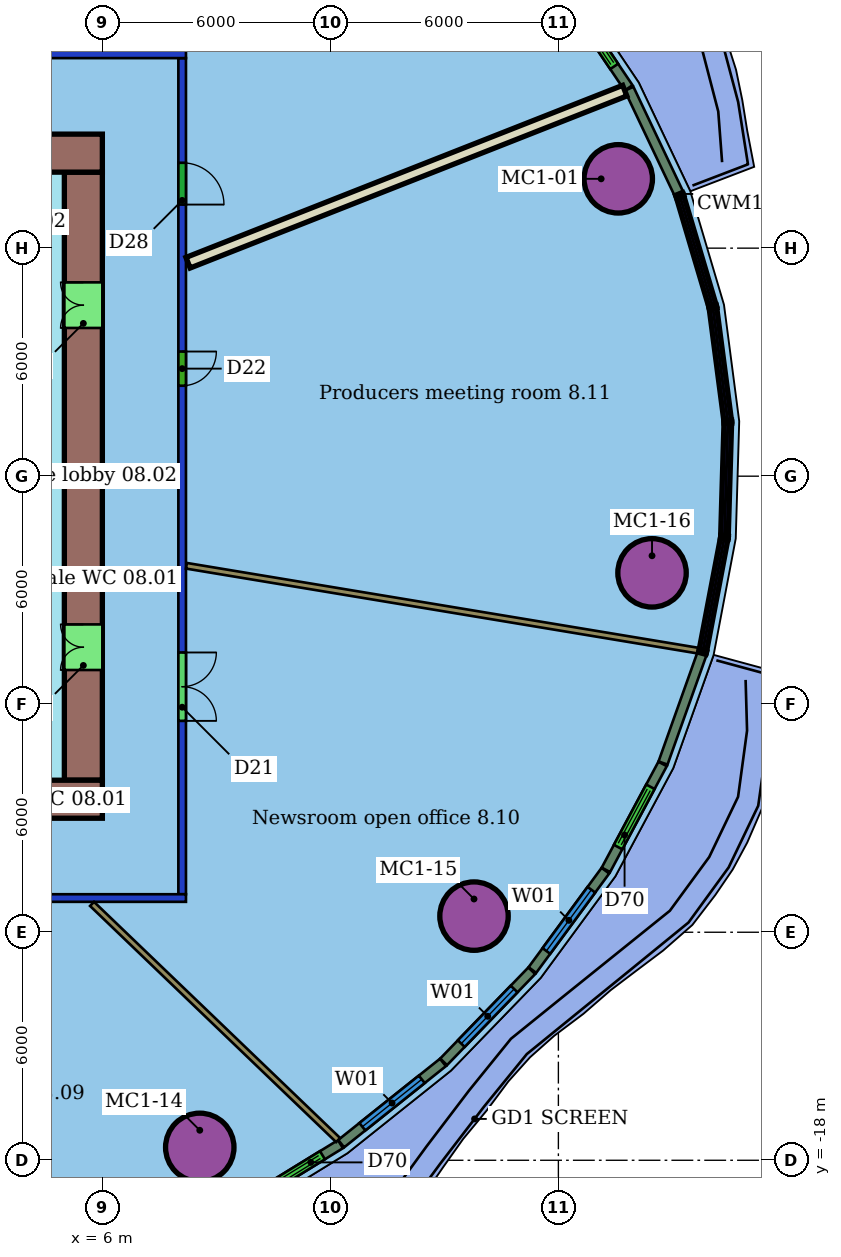
"""IFC4 building model, lengths in metres.
Left out: names, types, materials, properties, quantities, classifications, styles, units other than length and angle.
Written with IfcOpenShell. Run it as: python <this file> out.ifc"""

import sys

from ifc_helpers import new_model, si_unit, direction, frame, frame_2d, origin, origin_2d, place, context, subcontext, project, spatial, rectangle, hollow_circle, extrude, element, fill, save


model = new_model("IFC4")
c1 = context("Model", 3, precision=1e-05, world=origin(), true_north=direction((0.0, 1.0)))
c2 = subcontext(c1, "Body", "Model", "MODEL_VIEW")
j1 = project(units=[si_unit("LENGTHUNIT", "METRE"), si_unit("PLANEANGLEUNIT", "RADIAN")], contexts=[c1])
p1 = place(None, origin())
s1 = spatial("IfcSite", under=j1, at=p1, CompositionType="ELEMENT")
p2 = place(p1, origin())
s2 = spatial("IfcBuilding", under=s1, at=p2, CompositionType="ELEMENT")
p3 = place(p2, frame((0.0, 0.0, 47.1)))
s3 = spatial("IfcBuildingStorey", under=s2, at=p3, CompositionType="ELEMENT", Elevation=47.1)
for number, where, z_axis, x_axis in (
    (1, (19.575, 7.824, 0.0), (0.0, 0.0, 1.0), (1.0, 0.0, 0.0)),
    (2, (8.563, -17.66, 0.0), (0.0, 0.0, 1.0), (1.0, 0.0, 0.0)),
    (3, (15.78, -11.576, 0.0), (0.0, 0.0, 1.0), (1.0, 0.0, 0.0)),
    (4, (20.464, -2.543, 0.0), (0.0, 0.0, 1.0), (1.0, 0.0, 0.0)),
):
    element("IfcColumn", number, at=place(p3, frame(where, z_axis=z_axis, x_axis=x_axis)), inside=s3, PredefinedType="COLUMN", context=c2, shape_type="SweptSolid", body=[
        extrude(hollow_circle(Radius=0.9, WallThickness=0.06, at=origin_2d()), origin(), (0.0, 0.0, 1.0), 3.55),
    ])
p4 = place(p3, frame((8.2, -11.1, 0.0), z_axis=(0.0, 0.0, 1.0), x_axis=(-1.0, 0.0, 0.0)))
e5 = element("IfcWall", 5, at=p4, inside=s3, PredefinedType="PARTITIONING", context=c2, shape_type="SweptSolid", body=[
    extrude(rectangle(XDim=28.4, YDim=0.2, at=frame_2d((14.2, 0.0))), origin(), (0.0, 0.0, 1.0), 2.85),
])
p5 = place(p4, frame((25.038, 0.0, 0.0)))
e6 = element("IfcOpeningElement", 6, at=p5, cuts=e5, PredefinedType="OPENING", context=c2, shape_type="SweptSolid", body=[
    extrude(rectangle(XDim=1.0, YDim=2.1, at=frame_2d((0.5, 1.05))), frame((0.0, 0.11, 0.0), z_axis=(0.0, -1.0, 0.0), x_axis=(1.0, 0.0, 0.0)), (0.0, 0.0, 1.0), 0.22),
])
p6 = place(p4, frame((18.73, 0.0, 0.0)))
e7 = element("IfcOpeningElement", 7, at=p6, cuts=e5, PredefinedType="OPENING", context=c2, shape_type="SweptSolid", body=[
    extrude(rectangle(XDim=1.8, YDim=2.1, at=frame_2d((0.9, 1.05))), frame((0.0, 0.11, 0.0), z_axis=(0.0, -1.0, 0.0), x_axis=(1.0, 0.0, 0.0)), (0.0, 0.0, 1.0), 0.22),
])
p7 = place(p4, frame((8.223, 0.0, 0.0)))
e8 = element("IfcOpeningElement", 8, at=p7, cuts=e5, PredefinedType="OPENING", context=c2, shape_type="SweptSolid", body=[
    extrude(rectangle(XDim=0.9, YDim=2.1, at=frame_2d((0.45, 1.05))), frame((0.0, 0.11, 0.0), z_axis=(0.0, -1.0, 0.0), x_axis=(1.0, 0.0, 0.0)), (0.0, 0.0, 1.0), 0.22),
])
p8 = place(p3, frame((-20.2, 11.1, 0.0), z_axis=(0.0, 0.0, 1.0), x_axis=(1.0, 0.0, 0.0)))
e9 = element("IfcWall", 9, at=p8, inside=s3, PredefinedType="PARTITIONING", context=c2, shape_type="SweptSolid", body=[
    extrude(rectangle(XDim=28.4, YDim=0.2, at=frame_2d((14.2, 0.0))), origin(), (0.0, 0.0, 1.0), 2.85),
])
p9 = place(p8, frame((19.669, 0.0, 0.0)))
e10 = element("IfcOpeningElement", 10, at=p9, cuts=e9, PredefinedType="OPENING", context=c2, shape_type="SweptSolid", body=[
    extrude(rectangle(XDim=1.2, YDim=2.1, at=frame_2d((0.6, 1.05))), frame((0.0, 0.11, 0.0), z_axis=(0.0, -1.0, 0.0), x_axis=(1.0, 0.0, 0.0)), (0.0, 0.0, 1.0), 0.22),
])
p10 = place(p8, frame((10.757, 0.0, 0.0)))
e11 = element("IfcOpeningElement", 11, at=p10, cuts=e9, PredefinedType="OPENING", context=c2, shape_type="SweptSolid", body=[
    extrude(rectangle(XDim=1.5, YDim=2.1, at=frame_2d((0.75, 1.05))), frame((0.0, 0.11, 0.0), z_axis=(0.0, -1.0, 0.0), x_axis=(1.0, 0.0, 0.0)), (0.0, 0.0, 1.0), 0.22),
])
p11 = place(p8, frame((5.946, 0.0, 0.0)))
e12 = element("IfcOpeningElement", 12, at=p11, cuts=e9, PredefinedType="OPENING", context=c2, shape_type="SweptSolid", body=[
    extrude(rectangle(XDim=1.1, YDim=2.1, at=frame_2d((0.55, 1.05))), frame((0.0, 0.11, 0.0), z_axis=(0.0, -1.0, 0.0), x_axis=(1.0, 0.0, 0.0)), (0.0, 0.0, 1.0), 0.22),
])
p12 = place(p3, frame((8.1, 11.0, 0.0), z_axis=(0.0, 0.0, 1.0), x_axis=(0.0, -1.0, 0.0)))
e13 = element("IfcWall", 13, at=p12, inside=s3, PredefinedType="PARTITIONING", context=c2, shape_type="SweptSolid", body=[
    extrude(rectangle(XDim=22.0, YDim=0.2, at=frame_2d((11.0, 0.0))), origin(), (0.0, 0.0, 1.0), 2.85),
])
p13 = place(p12, frame((2.753, 0.0, 0.0)))
e14 = element("IfcOpeningElement", 14, at=p13, cuts=e13, PredefinedType="OPENING", context=c2, shape_type="SweptSolid", body=[
    extrude(rectangle(XDim=1.1, YDim=2.1, at=frame_2d((0.55, 1.05))), frame((0.0, 0.11, 0.0), z_axis=(0.0, -1.0, 0.0), x_axis=(1.0, 0.0, 0.0)), (0.0, 0.0, 1.0), 0.22),
])
p14 = place(p12, frame((15.639, 0.0, 0.0)))
e15 = element("IfcOpeningElement", 15, at=p14, cuts=e13, PredefinedType="OPENING", context=c2, shape_type="SweptSolid", body=[
    extrude(rectangle(XDim=1.8, YDim=2.1, at=frame_2d((0.9, 1.05))), frame((0.0, 0.11, 0.0), z_axis=(0.0, -1.0, 0.0), x_axis=(1.0, 0.0, 0.0)), (0.0, 0.0, 1.0), 0.22),
])
p15 = place(p12, frame((7.72, 0.0, 0.0)))
e16 = element("IfcOpeningElement", 16, at=p15, cuts=e13, PredefinedType="OPENING", context=c2, shape_type="SweptSolid", body=[
    extrude(rectangle(XDim=0.9, YDim=2.1, at=frame_2d((0.45, 1.05))), frame((0.0, 0.11, 0.0), z_axis=(0.0, -1.0, 0.0), x_axis=(1.0, 0.0, 0.0)), (0.0, 0.0, 1.0), 0.22),
])
p16 = place(p3, frame((19.747, 10.144, 0.0), z_axis=(0.0, 0.0, 1.0), x_axis=(-0.930393072446, -0.366563406172, 0.0)))
e17 = element("IfcWall", 17, at=p16, inside=s3, PredefinedType="PARTITIONING", context=c2, shape_type="SweptSolid", body=[
    extrude(rectangle(XDim=12.352, YDim=0.3, at=frame_2d((6.176, 0.0))), origin(), (0.0, 0.0, 1.0), 3.55),
])
p17 = place(p3, frame((12.204, -17.468, 0.0), z_axis=(0.0, 0.0, 1.0), x_axis=(-0.721538439263, 0.692374378978, 0.0)))
e18 = element("IfcWall", 18, at=p17, inside=s3, PredefinedType="PARTITIONING", context=c2, shape_type="SweptSolid", body=[
    extrude(rectangle(XDim=8.974, YDim=0.15, at=frame_2d((4.487, 0.0))), origin(), (0.0, 0.0, 1.0), 3.55),
])
p18 = place(p3, frame((21.675, -4.59, 0.0), z_axis=(0.0, 0.0, 1.0), x_axis=(-0.986520789814, 0.163635971791, 0.0)))
e19 = element("IfcWall", 19, at=p18, inside=s3, PredefinedType="PARTITIONING", context=c2, shape_type="SweptSolid", body=[
    extrude(rectangle(XDim=13.647, YDim=0.15, at=frame_2d((6.823, 0.0))), origin(), (0.0, 0.0, 1.0), 3.55),
])
p19 = place(p3, frame((21.168, 7.439, 0.0), z_axis=(0.0, 0.0, 1.0), x_axis=(-0.428609341076, 0.903489918451, 0.0)))
e20 = element("IfcWall", 20, at=p19, inside=s3, PredefinedType="SOLIDWALL", context=c2, shape_type="SweptSolid", body=[
    extrude(rectangle(XDim=3.05, YDim=0.25, at=frame_2d((1.525, 0.0))), origin(), (0.0, 0.0, 1.0), 3.15),
])
p20 = place(p3, frame((19.848, 10.217, 0.0), z_axis=(0.0, 0.0, 1.0), x_axis=(-0.558028768247, 0.829821603605, 0.0)))
e21 = element("IfcWall", 21, at=p20, inside=s3, PredefinedType="SOLIDWALL", context=c2, shape_type="SweptSolid", body=[
    extrude(rectangle(XDim=3.161, YDim=0.25, at=frame_2d((1.581, 0.0))), origin(), (0.0, 0.0, 1.0), 3.15),
])
p21 = place(p20, frame((0.68, 0.0, 0.0)))
e22 = element("IfcOpeningElement", 22, at=p21, cuts=e21, PredefinedType="OPENING", context=c2, shape_type="SweptSolid", body=[
    extrude(rectangle(XDim=1.8, YDim=2.4, at=frame_2d((0.9, 1.2))), frame((0.0, 0.135, 0.0), z_axis=(0.0, -1.0, 0.0), x_axis=(1.0, 0.0, 0.0)), (0.0, 0.0, 1.0), 0.27),
])
p22 = place(p3, frame((9.274, -19.415, 0.0), z_axis=(0.0, 0.0, 1.0), x_axis=(0.851885012521, 0.523728866344, 0.0)))
e23 = element("IfcWall", 23, at=p22, inside=s3, PredefinedType="SOLIDWALL", context=c2, shape_type="SweptSolid", body=[
    extrude(rectangle(XDim=3.511, YDim=0.25, at=frame_2d((1.756, 0.0))), origin(), (0.0, 0.0, 1.0), 3.15),
])
p23 = place(p22, frame((1.156, 0.0, 0.0)))
e24 = element("IfcOpeningElement", 24, at=p23, cuts=e23, PredefinedType="OPENING", context=c2, shape_type="SweptSolid", body=[
    extrude(rectangle(XDim=1.8, YDim=2.4, at=frame_2d((0.9, 1.2))), frame((0.0, 0.135, 0.0), z_axis=(0.0, -1.0, 0.0), x_axis=(1.0, 0.0, 0.0)), (0.0, 0.0, 1.0), 0.27),
])
p24 = place(p3, frame((12.284, -17.562, 0.0), z_axis=(0.0, 0.0, 1.0), x_axis=(0.78173709479, 0.623608141888, 0.0)))
e25 = element("IfcWall", 25, at=p24, inside=s3, PredefinedType="SOLIDWALL", context=c2, shape_type="SweptSolid", body=[
    extrude(rectangle(XDim=3.426, YDim=0.25, at=frame_2d((1.713, 0.0))), origin(), (0.0, 0.0, 1.0), 3.15),
])
p25 = place(p24, frame((0.713, 0.0, 0.8)))
e26 = element("IfcOpeningElement", 26, at=p25, cuts=e25, PredefinedType="OPENING", context=c2, shape_type="SweptSolid", body=[
    extrude(rectangle(XDim=2.0, YDim=2.2, at=frame_2d((1.0, 1.1))), frame((0.0, 0.135, 0.0), z_axis=(0.0, -1.0, 0.0), x_axis=(1.0, 0.0, 0.0)), (0.0, 0.0, 1.0), 0.27),
])
p26 = place(p3, frame((14.98, -15.41, 0.0), z_axis=(0.0, 0.0, 1.0), x_axis=(0.695444598624, 0.718579717391, 0.0)))
e27 = element("IfcWall", 27, at=p26, inside=s3, PredefinedType="SOLIDWALL", context=c2, shape_type="SweptSolid", body=[
    extrude(rectangle(XDim=3.335, YDim=0.25, at=frame_2d((1.667, 0.0))), origin(), (0.0, 0.0, 1.0), 3.15),
])
p27 = place(p26, frame((0.667, 0.0, 0.8)))
e28 = element("IfcOpeningElement", 28, at=p27, cuts=e27, PredefinedType="OPENING", context=c2, shape_type="SweptSolid", body=[
    extrude(rectangle(XDim=2.0, YDim=2.2, at=frame_2d((1.0, 1.1))), frame((0.0, 0.135, 0.0), z_axis=(0.0, -1.0, 0.0), x_axis=(1.0, 0.0, 0.0)), (0.0, 0.0, 1.0), 0.27),
])
p28 = place(p3, frame((17.316, -12.994, 0.0), z_axis=(0.0, 0.0, 1.0), x_axis=(0.592218050456, 0.805777748957, 0.0)))
e29 = element("IfcWall", 29, at=p28, inside=s3, PredefinedType="SOLIDWALL", context=c2, shape_type="SweptSolid", body=[
    extrude(rectangle(XDim=3.244, YDim=0.25, at=frame_2d((1.622, 0.0))), origin(), (0.0, 0.0, 1.0), 3.15),
])
p29 = place(p28, frame((0.622, 0.0, 0.8)))
e30 = element("IfcOpeningElement", 30, at=p29, cuts=e29, PredefinedType="OPENING", context=c2, shape_type="SweptSolid", body=[
    extrude(rectangle(XDim=2.0, YDim=2.2, at=frame_2d((1.0, 1.1))), frame((0.0, 0.135, 0.0), z_axis=(0.0, -1.0, 0.0), x_axis=(1.0, 0.0, 0.0)), (0.0, 0.0, 1.0), 0.27),
])
p30 = place(p3, frame((19.251, -10.358, 0.0), z_axis=(0.0, 0.0, 1.0), x_axis=(0.47194273939, 0.88162920252, 0.0)))
e31 = element("IfcWall", 31, at=p30, inside=s3, PredefinedType="SOLIDWALL", context=c2, shape_type="SweptSolid", body=[
    extrude(rectangle(XDim=3.161, YDim=0.25, at=frame_2d((1.58, 0.0))), origin(), (0.0, 0.0, 1.0), 3.15),
])
p31 = place(p30, frame((0.68, 0.0, 0.0)))
e32 = element("IfcOpeningElement", 32, at=p31, cuts=e31, PredefinedType="OPENING", context=c2, shape_type="SweptSolid", body=[
    extrude(rectangle(XDim=1.8, YDim=2.4, at=frame_2d((0.9, 1.2))), frame((0.0, 0.135, 0.0), z_axis=(0.0, -1.0, 0.0), x_axis=(1.0, 0.0, 0.0)), (0.0, 0.0, 1.0), 0.27),
])
p32 = place(p3, frame((20.753, -7.547, 0.0), z_axis=(0.0, 0.0, 1.0), x_axis=(0.335758185924, 0.941948215448, 0.0)))
e33 = element("IfcWall", 33, at=p32, inside=s3, PredefinedType="SOLIDWALL", context=c2, shape_type="SweptSolid", body=[
    extrude(rectangle(XDim=3.05, YDim=0.25, at=frame_2d((1.525, 0.0))), origin(), (0.0, 0.0, 1.0), 3.15),
])
p33 = place(p3, frame((6.0, 8.5, 0.0), z_axis=(0.0, 0.0, 1.0), x_axis=(-1.0, 0.0, 0.0)))
e34 = element("IfcWall", 34, at=p33, inside=s3, PredefinedType="SHEAR", context=c2, shape_type="SweptSolid", body=[
    extrude(rectangle(XDim=12.0, YDim=1.0, at=frame_2d((6.0, 0.0))), origin(), (0.0, 0.0, 1.0), 3.4),
])
p34 = place(p33, frame((5.6, 0.0, 0.0)))
e35 = element("IfcOpeningElement", 35, at=p34, cuts=e34, PredefinedType="OPENING", context=c2, shape_type="SweptSolid", body=[
    extrude(rectangle(XDim=1.2, YDim=2.1, at=frame_2d((0.6, 1.05))), frame((0.0, 0.51, 0.0), z_axis=(0.0, -1.0, 0.0), x_axis=(1.0, 0.0, 0.0)), (0.0, 0.0, 1.0), 1.02),
])
p35 = place(p3, frame((-18.0, -8.5, 0.0), z_axis=(0.0, 0.0, 1.0), x_axis=(1.0, 0.0, 0.0)))
e36 = element("IfcWall", 36, at=p35, inside=s3, PredefinedType="SHEAR", context=c2, shape_type="SweptSolid", body=[
    extrude(rectangle(XDim=24.0, YDim=1.0, at=frame_2d((12.0, 0.0))), origin(), (0.0, 0.0, 1.0), 3.4),
])
p36 = place(p35, frame((6.0, 0.0, 0.0)))
e37 = element("IfcOpeningElement", 37, at=p36, cuts=e36, PredefinedType="OPENING", context=c2, shape_type="SweptSolid", body=[
    extrude(rectangle(XDim=1.2, YDim=2.1, at=frame_2d((0.6, 1.05))), frame((0.0, 0.51, 0.0), z_axis=(0.0, -1.0, 0.0), x_axis=(1.0, 0.0, 0.0)), (0.0, 0.0, 1.0), 1.02),
])
p37 = place(p3, frame((5.5, -8.0, 0.0), z_axis=(0.0, 0.0, 1.0), x_axis=(0.0, 1.0, 0.0)))
e38 = element("IfcWall", 38, at=p37, inside=s3, PredefinedType="SHEAR", context=c2, shape_type="SweptSolid", body=[
    extrude(rectangle(XDim=16.0, YDim=1.0, at=frame_2d((8.0, 0.0))), origin(), (0.0, 0.0, 1.0), 3.4),
])
p38 = place(p37, frame((2.9, 0.0, 0.0)))
e39 = element("IfcOpeningElement", 39, at=p38, cuts=e38, PredefinedType="OPENING", context=c2, shape_type="SweptSolid", body=[
    extrude(rectangle(XDim=1.2, YDim=2.1, at=frame_2d((0.6, 1.05))), frame((0.0, 0.51, 0.0), z_axis=(0.0, -1.0, 0.0), x_axis=(1.0, 0.0, 0.0)), (0.0, 0.0, 1.0), 1.02),
])
p39 = place(p37, frame((11.9, 0.0, 0.0)))
e40 = element("IfcOpeningElement", 40, at=p39, cuts=e38, PredefinedType="OPENING", context=c2, shape_type="SweptSolid", body=[
    extrude(rectangle(XDim=1.2, YDim=2.1, at=frame_2d((0.6, 1.05))), frame((0.0, 0.51, 0.0), z_axis=(0.0, -1.0, 0.0), x_axis=(1.0, 0.0, 0.0)), (0.0, 0.0, 1.0), 1.02),
])
p40 = place(p13, origin())
e41 = element("IfcDoor", 41, at=p40, inside=s3, OperationType="SINGLE_SWING_RIGHT", PredefinedType="DOOR", context=c2, shape_type="SweptSolid", body=[
    extrude(rectangle(XDim=1.1, YDim=2.1, at=frame_2d((0.55, 1.05))), frame((0.0, 0.025, 0.0), z_axis=(0.0, -1.0, 0.0), x_axis=(1.0, 0.0, 0.0)), (0.0, 0.0, 1.0), 0.05),
])
fill(e14, e41)
p41 = place(p14, origin())
e42 = element("IfcDoor", 42, at=p41, inside=s3, OperationType="DOUBLE_DOOR_SINGLE_SWING", PredefinedType="DOOR", context=c2, shape_type="SweptSolid", body=[
    extrude(rectangle(XDim=1.8, YDim=2.1, at=frame_2d((0.9, 1.05))), frame((0.0, 0.025, 0.0), z_axis=(0.0, -1.0, 0.0), x_axis=(1.0, 0.0, 0.0)), (0.0, 0.0, 1.0), 0.05),
])
fill(e15, e42)
p42 = place(p15, origin())
e43 = element("IfcDoor", 43, at=p42, inside=s3, OperationType="SINGLE_SWING_LEFT", PredefinedType="DOOR", context=c2, shape_type="SweptSolid", body=[
    extrude(rectangle(XDim=0.9, YDim=2.1, at=frame_2d((0.45, 1.05))), frame((0.0, 0.025, 0.0), z_axis=(0.0, -1.0, 0.0), x_axis=(1.0, 0.0, 0.0)), (0.0, 0.0, 1.0), 0.05),
])
fill(e16, e43)
p43 = place(p21, origin())
e44 = element("IfcDoor", 44, at=p43, inside=s3, OperationType="DOUBLE_DOOR_SLIDING", PredefinedType="DOOR", context=c2, shape_type="SweptSolid", body=[
    extrude(rectangle(XDim=1.8, YDim=2.4, at=frame_2d((0.9, 1.2))), frame((0.0, 0.025, 0.0), z_axis=(0.0, -1.0, 0.0), x_axis=(1.0, 0.0, 0.0)), (0.0, 0.0, 1.0), 0.05),
])
fill(e22, e44)
p44 = place(p23, origin())
e45 = element("IfcDoor", 45, at=p44, inside=s3, OperationType="DOUBLE_DOOR_SLIDING", PredefinedType="DOOR", context=c2, shape_type="SweptSolid", body=[
    extrude(rectangle(XDim=1.8, YDim=2.4, at=frame_2d((0.9, 1.2))), frame((0.0, 0.025, 0.0), z_axis=(0.0, -1.0, 0.0), x_axis=(1.0, 0.0, 0.0)), (0.0, 0.0, 1.0), 0.05),
])
fill(e24, e45)
p45 = place(p25, origin())
e46 = element("IfcWindow", 46, at=p45, inside=s3, PartitioningType="SINGLE_PANEL", PredefinedType="WINDOW", context=c2, shape_type="SweptSolid", body=[
    extrude(rectangle(XDim=2.0, YDim=2.2, at=frame_2d((1.0, 1.1))), frame((0.0, 0.03, 0.0), z_axis=(0.0, -1.0, 0.0), x_axis=(1.0, 0.0, 0.0)), (0.0, 0.0, 1.0), 0.06),
])
fill(e26, e46)
p46 = place(p27, origin())
e47 = element("IfcWindow", 47, at=p46, inside=s3, PartitioningType="SINGLE_PANEL", PredefinedType="WINDOW", context=c2, shape_type="SweptSolid", body=[
    extrude(rectangle(XDim=2.0, YDim=2.2, at=frame_2d((1.0, 1.1))), frame((0.0, 0.03, 0.0), z_axis=(0.0, -1.0, 0.0), x_axis=(1.0, 0.0, 0.0)), (0.0, 0.0, 1.0), 0.06),
])
fill(e28, e47)
p47 = place(p29, origin())
e48 = element("IfcWindow", 48, at=p47, inside=s3, PartitioningType="SINGLE_PANEL", PredefinedType="WINDOW", context=c2, shape_type="SweptSolid", body=[
    extrude(rectangle(XDim=2.0, YDim=2.2, at=frame_2d((1.0, 1.1))), frame((0.0, 0.03, 0.0), z_axis=(0.0, -1.0, 0.0), x_axis=(1.0, 0.0, 0.0)), (0.0, 0.0, 1.0), 0.06),
])
fill(e30, e48)
p48 = place(p31, origin())
e49 = element("IfcDoor", 49, at=p48, inside=s3, OperationType="DOUBLE_DOOR_SLIDING", PredefinedType="DOOR", context=c2, shape_type="SweptSolid", body=[
    extrude(rectangle(XDim=1.8, YDim=2.4, at=frame_2d((0.9, 1.2))), frame((0.0, 0.025, 0.0), z_axis=(0.0, -1.0, 0.0), x_axis=(1.0, 0.0, 0.0)), (0.0, 0.0, 1.0), 0.05),
])
fill(e32, e49)
p49 = place(p38, origin())
e50 = element("IfcDoor", 50, at=p49, inside=s3, OperationType="DOUBLE_DOOR_SINGLE_SWING", PredefinedType="NOTDEFINED", context=c2, shape_type="SweptSolid", body=[
    extrude(rectangle(XDim=1.2, YDim=2.1, at=frame_2d((0.6, 1.05))), frame((0.0, 0.025, 0.0), z_axis=(0.0, -1.0, 0.0), x_axis=(1.0, 0.0, 0.0)), (0.0, 0.0, 1.0), 0.05),
])
fill(e39, e50)
p50 = place(p39, origin())
e51 = element("IfcDoor", 51, at=p50, inside=s3, OperationType="DOUBLE_DOOR_SINGLE_SWING", PredefinedType="NOTDEFINED", context=c2, shape_type="SweptSolid", body=[
    extrude(rectangle(XDim=1.2, YDim=2.1, at=frame_2d((0.6, 1.05))), frame((0.0, 0.025, 0.0), z_axis=(0.0, -1.0, 0.0), x_axis=(1.0, 0.0, 0.0)), (0.0, 0.0, 1.0), 0.05),
])
fill(e40, e51)
save(model, sys.argv[1])
